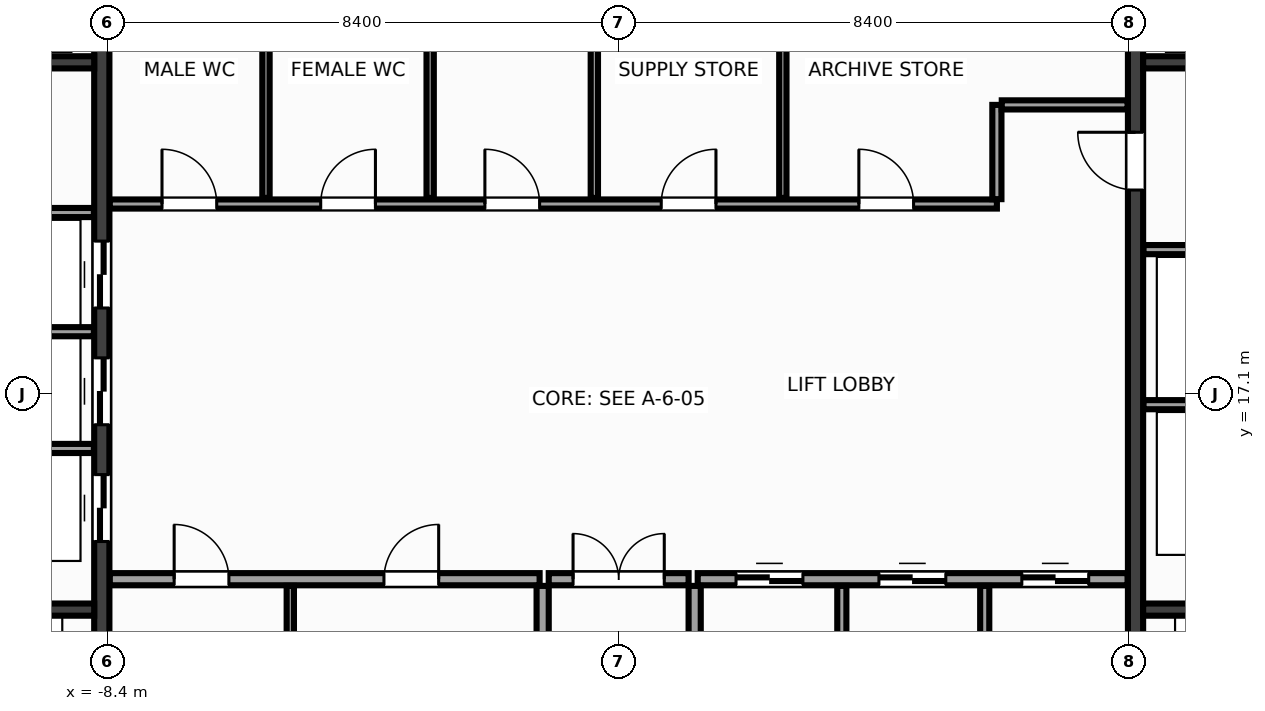
"""IFC4 building model, lengths in metres.
Left out: names, types, materials, properties, quantities, classifications, styles, units other than length and angle.
Written with IfcOpenShell. Run it as: python <this file> out.ifc"""

import sys

from ifc_helpers import new_model, si_unit, direction, frame, frame_2d, origin, place, context, subcontext, project, spatial, rectangle, extrude, source, transform, mapped, element, fill, save


model = new_model("IFC4")
c1 = context("Model", 3, precision=1e-05, world=origin(), true_north=direction((0.0, 1.0)))
c2 = subcontext(c1, "Body", "Model", "MODEL_VIEW")
j1 = project(units=[si_unit("LENGTHUNIT", "METRE"), si_unit("PLANEANGLEUNIT", "RADIAN")], contexts=[c1])
p1 = place(None, origin())
s1 = spatial("IfcSite", under=j1, at=p1, CompositionType="ELEMENT")
p2 = place(p1, origin())
s2 = spatial("IfcBuilding", under=s1, at=p2, CompositionType="ELEMENT")
p3 = place(p2, frame((0.0, 0.0, 182.0)))
s3 = spatial("IfcBuildingStorey", under=s2, at=p3, CompositionType="ELEMENT", Elevation=182.0)
m1 = source(origin(), c2, "Body", "SweptSolid", [
    extrude(rectangle(XDim=12.95, YDim=0.25, at=frame_2d((6.475, 0.0))), origin(), (0.0, 0.0, 1.0), 3.6),
])
p4 = place(p3, frame((-8.5, 10.525, 0.0), z_axis=(0.0, 0.0, 1.0), x_axis=(0.0, 1.0, 0.0)))
e1 = element("IfcWall", 1, at=p4, inside=s3, PredefinedType="SHEAR", context=c2, shape_type="MappedRepresentation", body=[
    mapped(m1, transform((0.0, 0.0, 0.0), x_axis=(1.0, 0.0, 0.0), y_axis=(0.0, 1.0, 0.0), z_axis=(0.0, 0.0, 1.0), scale=1.0)),
])
p5 = place(p4, frame((4.145, 0.0, 0.0)))
e2 = element("IfcOpeningElement", 2, at=p5, cuts=e1, PredefinedType="OPENING", context=c2, shape_type="SweptSolid", body=[
    extrude(rectangle(XDim=1.1, YDim=2.15, at=frame_2d((0.55, 1.075))), frame((0.0, 0.137, 0.0), z_axis=(0.0, -1.0, 0.0), x_axis=(1.0, 0.0, 0.0)), (0.0, 0.0, 1.0), 0.274),
])
p6 = place(p4, frame((6.065, 0.0, 0.0)))
e3 = element("IfcOpeningElement", 3, at=p6, cuts=e1, PredefinedType="OPENING", context=c2, shape_type="SweptSolid", body=[
    extrude(rectangle(XDim=1.1, YDim=2.15, at=frame_2d((0.55, 1.075))), frame((0.0, 0.137, 0.0), z_axis=(0.0, -1.0, 0.0), x_axis=(1.0, 0.0, 0.0)), (0.0, 0.0, 1.0), 0.274),
])
p7 = place(p4, frame((7.985, 0.0, 0.0)))
e4 = element("IfcOpeningElement", 4, at=p7, cuts=e1, PredefinedType="OPENING", context=c2, shape_type="SweptSolid", body=[
    extrude(rectangle(XDim=1.1, YDim=2.15, at=frame_2d((0.55, 1.075))), frame((0.0, 0.137, 0.0), z_axis=(0.0, -1.0, 0.0), x_axis=(1.0, 0.0, 0.0)), (0.0, 0.0, 1.0), 0.274),
])
p8 = place(p3, frame((8.5, 10.525, 0.0), z_axis=(0.0, 0.0, 1.0), x_axis=(0.0, 1.0, 0.0)))
e5 = element("IfcWall", 5, at=p8, inside=s3, PredefinedType="SHEAR", context=c2, shape_type="MappedRepresentation", body=[
    mapped(m1, transform((0.0, 0.0, 0.0), x_axis=(1.0, 0.0, 0.0), y_axis=(0.0, 1.0, 0.0), z_axis=(0.0, 0.0, 1.0), scale=1.0)),
])
p9 = place(p8, frame((9.925, 0.0, 0.0)))
e6 = element("IfcOpeningElement", 6, at=p9, cuts=e5, PredefinedType="OPENING", context=c2, shape_type="SweptSolid", body=[
    extrude(rectangle(XDim=0.95, YDim=2.15, at=frame_2d((0.475, 1.075))), frame((0.0, 0.137, 0.0), z_axis=(0.0, -1.0, 0.0), x_axis=(1.0, 0.0, 0.0)), (0.0, 0.0, 1.0), 0.274),
])
m2 = source(origin(), c2, "Body", "SweptSolid", [
    extrude(rectangle(XDim=2.825, YDim=0.2, at=frame_2d((1.413, 0.0))), origin(), (0.0, 0.0, 1.0), 3.6),
])
for number, where, z_axis, x_axis in (
    (7, (-11.45, 13.55, 0.0), (0.0, 0.0, 1.0), (1.0, 0.0, 0.0)),
    (8, (8.625, 13.55, 0.0), (0.0, 0.0, 1.0), (1.0, 0.0, 0.0)),
):
    element("IfcWall", number, at=place(p3, frame(where, z_axis=z_axis, x_axis=x_axis)), inside=s3, PredefinedType="SHEAR", context=c2, shape_type="MappedRepresentation", body=[
        mapped(m2, transform((0.0, 0.0, 0.0), x_axis=(1.0, 0.0, 0.0), y_axis=(0.0, 1.0, 0.0), z_axis=(0.0, 0.0, 1.0), scale=1.0)),
    ])
m3 = source(origin(), c2, "Body", "SweptSolid", [
    extrude(rectangle(XDim=3.02, YDim=0.2, at=frame_2d((1.51, 0.0))), origin(), (0.0, 0.0, 1.0), 3.6),
])
for number, where, z_axis, x_axis in (
    (9, (-11.645, 22.55, 0.0), (0.0, 0.0, 1.0), (1.0, 0.0, 0.0)),
    (10, (8.625, 22.55, 0.0), (0.0, 0.0, 1.0), (1.0, 0.0, 0.0)),
):
    element("IfcWall", number, at=place(p3, frame(where, z_axis=z_axis, x_axis=x_axis)), inside=s3, PredefinedType="SHEAR", context=c2, shape_type="MappedRepresentation", body=[
        mapped(m3, transform((0.0, 0.0, 0.0), x_axis=(1.0, 0.0, 0.0), y_axis=(0.0, 1.0, 0.0), z_axis=(0.0, 0.0, 1.0), scale=1.0)),
    ])
m4 = source(origin(), c2, "Body", "SweptSolid", [
    extrude(rectangle(XDim=3.01, YDim=0.15, at=frame_2d((1.505, 0.0))), origin(), (0.0, 0.0, 1.0), 3.38),
])
for number, where, z_axis, x_axis in (
    (11, (-11.64, 16.2, 0.0), (0.0, 0.0, 1.0), (1.0, 0.0, 0.0)),
    (12, (-11.64, 18.12, 0.0), (0.0, 0.0, 1.0), (1.0, 0.0, 0.0)),
    (13, (-11.64, 20.08, 0.0), (0.0, 0.0, 1.0), (1.0, 0.0, 0.0)),
    (14, (8.63, 16.92, 0.0), (0.0, 0.0, 1.0), (1.0, 0.0, 0.0)),
    (15, (8.63, 19.47, 0.0), (0.0, 0.0, 1.0), (1.0, 0.0, 0.0)),
):
    element("IfcWall", number, at=place(p3, frame(where, z_axis=z_axis, x_axis=x_axis)), inside=s3, PredefinedType="PARTITIONING", context=c2, shape_type="MappedRepresentation", body=[
        mapped(m4, transform((0.0, 0.0, 0.0), x_axis=(1.0, 0.0, 0.0), y_axis=(0.0, 1.0, 0.0), z_axis=(0.0, 0.0, 1.0), scale=1.0)),
    ])
m5 = source(origin(), c2, "Body", "SweptSolid", [
    extrude(rectangle(XDim=7.07, YDim=0.2, at=frame_2d((3.535, 0.0))), origin(), (0.0, 0.0, 1.0), 3.38),
])
p10 = place(p3, frame((-8.37, 14.05, 0.0), z_axis=(0.0, 0.0, 1.0), x_axis=(1.0, 0.0, 0.0)))
e16 = element("IfcWall", 16, at=p10, inside=s3, PredefinedType="PARTITIONING", context=c2, shape_type="MappedRepresentation", body=[
    mapped(m5, transform((0.0, 0.0, 0.0), x_axis=(1.0, 0.0, 0.0), y_axis=(0.0, 1.0, 0.0), z_axis=(0.0, 0.0, 1.0), scale=1.0)),
])
p11 = place(p10, frame((1.06, 0.0, 0.0)))
e17 = element("IfcOpeningElement", 17, at=p11, cuts=e16, PredefinedType="OPENING", context=c2, shape_type="SweptSolid", body=[
    extrude(rectangle(XDim=0.9, YDim=2.15, at=frame_2d((0.45, 1.075))), frame((0.0, 0.112, 0.0), z_axis=(0.0, -1.0, 0.0), x_axis=(1.0, 0.0, 0.0)), (0.0, 0.0, 1.0), 0.224),
])
p12 = place(p10, frame((4.51, 0.0, 0.0)))
e18 = element("IfcOpeningElement", 18, at=p12, cuts=e16, PredefinedType="OPENING", context=c2, shape_type="SweptSolid", body=[
    extrude(rectangle(XDim=0.9, YDim=2.15, at=frame_2d((0.45, 1.075))), frame((0.0, 0.112, 0.0), z_axis=(0.0, -1.0, 0.0), x_axis=(1.0, 0.0, 0.0)), (0.0, 0.0, 1.0), 0.224),
])
p13 = place(p3, frame((1.3, 14.05, 0.0), z_axis=(0.0, 0.0, 1.0), x_axis=(1.0, 0.0, 0.0)))
e19 = element("IfcWall", 19, at=p13, inside=s3, PredefinedType="PARTITIONING", context=c2, shape_type="MappedRepresentation", body=[
    mapped(m5, transform((0.0, 0.0, 0.0), x_axis=(1.0, 0.0, 0.0), y_axis=(0.0, 1.0, 0.0), z_axis=(0.0, 0.0, 1.0), scale=1.0)),
])
p14 = place(p13, frame((0.63, 0.0, 0.0)))
e20 = element("IfcOpeningElement", 20, at=p14, cuts=e19, PredefinedType="OPENING", context=c2, shape_type="SweptSolid", body=[
    extrude(rectangle(XDim=1.1, YDim=2.15, at=frame_2d((0.55, 1.075))), frame((0.0, 0.112, 0.0), z_axis=(0.0, -1.0, 0.0), x_axis=(1.0, 0.0, 0.0)), (0.0, 0.0, 1.0), 0.224),
])
p15 = place(p13, frame((2.98, 0.0, 0.0)))
e21 = element("IfcOpeningElement", 21, at=p15, cuts=e19, PredefinedType="OPENING", context=c2, shape_type="SweptSolid", body=[
    extrude(rectangle(XDim=1.1, YDim=2.15, at=frame_2d((0.55, 1.075))), frame((0.0, 0.112, 0.0), z_axis=(0.0, -1.0, 0.0), x_axis=(1.0, 0.0, 0.0)), (0.0, 0.0, 1.0), 0.224),
])
p16 = place(p13, frame((5.33, 0.0, 0.0)))
e22 = element("IfcOpeningElement", 22, at=p16, cuts=e19, PredefinedType="OPENING", context=c2, shape_type="SweptSolid", body=[
    extrude(rectangle(XDim=1.1, YDim=2.15, at=frame_2d((0.55, 1.075))), frame((0.0, 0.112, 0.0), z_axis=(0.0, -1.0, 0.0), x_axis=(1.0, 0.0, 0.0)), (0.0, 0.0, 1.0), 0.224),
])
m6 = source(origin(), c2, "Body", "SweptSolid", [
    extrude(rectangle(XDim=3.415, YDim=0.2, at=frame_2d((1.708, 0.0))), origin(), (0.0, 0.0, 1.0), 3.38),
])
for number, where, z_axis, x_axis in (
    (23, (-1.25, 10.525, 0.0), (0.0, 0.0, 1.0), (0.0, 1.0, 0.0)),
    (24, (1.25, 10.525, 0.0), (0.0, 0.0, 1.0), (0.0, 1.0, 0.0)),
):
    element("IfcWall", number, at=place(p3, frame(where, z_axis=z_axis, x_axis=x_axis)), inside=s3, PredefinedType="PARTITIONING", context=c2, shape_type="MappedRepresentation", body=[
        mapped(m6, transform((0.0, 0.0, 0.0), x_axis=(1.0, 0.0, 0.0), y_axis=(0.0, 1.0, 0.0), z_axis=(0.0, 0.0, 1.0), scale=1.0)),
    ])
m7 = source(origin(), c2, "Body", "SweptSolid", [
    extrude(rectangle(XDim=2.3, YDim=0.2, at=frame_2d((1.15, 0.0))), origin(), (0.0, 0.0, 1.0), 3.38),
])
p17 = place(p3, frame((-1.15, 14.05, 0.0), z_axis=(0.0, 0.0, 1.0), x_axis=(1.0, 0.0, 0.0)))
e25 = element("IfcWall", 25, at=p17, inside=s3, PredefinedType="PARTITIONING", context=c2, shape_type="MappedRepresentation", body=[
    mapped(m7, transform((0.0, 0.0, 0.0), x_axis=(1.0, 0.0, 0.0), y_axis=(0.0, 1.0, 0.0), z_axis=(0.0, 0.0, 1.0), scale=1.0)),
])
p18 = place(p17, frame((0.4, 0.0, 0.0)))
e26 = element("IfcOpeningElement", 26, at=p18, cuts=e25, PredefinedType="OPENING", context=c2, shape_type="SweptSolid", body=[
    extrude(rectangle(XDim=1.5, YDim=2.2, at=frame_2d((0.75, 1.1))), frame((0.0, 0.112, 0.0), z_axis=(0.0, -1.0, 0.0), x_axis=(1.0, 0.0, 0.0)), (0.0, 0.0, 1.0), 0.224),
])
m8 = source(origin(), c2, "Body", "SweptSolid", [
    extrude(rectangle(XDim=14.59, YDim=0.15, at=frame_2d((7.295, 0.0))), origin(), (0.0, 0.0, 1.0), 3.38),
])
p19 = place(p3, frame((-8.37, 20.22, 0.0), z_axis=(0.0, 0.0, 1.0), x_axis=(1.0, 0.0, 0.0)))
e27 = element("IfcWall", 27, at=p19, inside=s3, PredefinedType="PARTITIONING", context=c2, shape_type="MappedRepresentation", body=[
    mapped(m8, transform((0.0, 0.0, 0.0), x_axis=(1.0, 0.0, 0.0), y_axis=(0.0, 1.0, 0.0), z_axis=(0.0, 0.0, 1.0), scale=1.0)),
])
p20 = place(p19, frame((0.86, 0.0, 0.0)))
e28 = element("IfcOpeningElement", 28, at=p20, cuts=e27, PredefinedType="OPENING", context=c2, shape_type="SweptSolid", body=[
    extrude(rectangle(XDim=0.9, YDim=2.15, at=frame_2d((0.45, 1.075))), frame((0.0, 0.087, 0.0), z_axis=(0.0, -1.0, 0.0), x_axis=(1.0, 0.0, 0.0)), (0.0, 0.0, 1.0), 0.174),
])
p21 = place(p19, frame((3.47, 0.0, 0.0)))
e29 = element("IfcOpeningElement", 29, at=p21, cuts=e27, PredefinedType="OPENING", context=c2, shape_type="SweptSolid", body=[
    extrude(rectangle(XDim=0.9, YDim=2.15, at=frame_2d((0.45, 1.075))), frame((0.0, 0.087, 0.0), z_axis=(0.0, -1.0, 0.0), x_axis=(1.0, 0.0, 0.0)), (0.0, 0.0, 1.0), 0.174),
])
p22 = place(p19, frame((6.17, 0.0, 0.0)))
e30 = element("IfcOpeningElement", 30, at=p22, cuts=e27, PredefinedType="OPENING", context=c2, shape_type="SweptSolid", body=[
    extrude(rectangle(XDim=0.9, YDim=2.15, at=frame_2d((0.45, 1.075))), frame((0.0, 0.087, 0.0), z_axis=(0.0, -1.0, 0.0), x_axis=(1.0, 0.0, 0.0)), (0.0, 0.0, 1.0), 0.174),
])
p23 = place(p19, frame((9.07, 0.0, 0.0)))
e31 = element("IfcOpeningElement", 31, at=p23, cuts=e27, PredefinedType="OPENING", context=c2, shape_type="SweptSolid", body=[
    extrude(rectangle(XDim=0.9, YDim=2.15, at=frame_2d((0.45, 1.075))), frame((0.0, 0.087, 0.0), z_axis=(0.0, -1.0, 0.0), x_axis=(1.0, 0.0, 0.0)), (0.0, 0.0, 1.0), 0.174),
])
p24 = place(p19, frame((12.32, 0.0, 0.0)))
e32 = element("IfcOpeningElement", 32, at=p24, cuts=e27, PredefinedType="OPENING", context=c2, shape_type="SweptSolid", body=[
    extrude(rectangle(XDim=0.9, YDim=2.15, at=frame_2d((0.45, 1.075))), frame((0.0, 0.087, 0.0), z_axis=(0.0, -1.0, 0.0), x_axis=(1.0, 0.0, 0.0)), (0.0, 0.0, 1.0), 0.174),
])
m9 = source(origin(), c2, "Body", "SweptSolid", [
    extrude(rectangle(XDim=1.55, YDim=0.15, at=frame_2d((0.775, 0.0))), origin(), (0.0, 0.0, 1.0), 3.38),
])
p25 = place(p3, frame((6.22, 20.3, 0.0), z_axis=(0.0, 0.0, 1.0), x_axis=(0.0, 1.0, 0.0)))
e33 = element("IfcWall", 33, at=p25, inside=s3, PredefinedType="PARTITIONING", context=c2, shape_type="MappedRepresentation", body=[
    mapped(m9, transform((0.0, 0.0, 0.0), x_axis=(1.0, 0.0, 0.0), y_axis=(0.0, 1.0, 0.0), z_axis=(0.0, 0.0, 1.0), scale=1.0)),
])
m10 = source(origin(), c2, "Body", "SweptSolid", [
    extrude(rectangle(XDim=2.07, YDim=0.15, at=frame_2d((1.035, 0.0))), origin(), (0.0, 0.0, 1.0), 3.38),
])
p26 = place(p3, frame((6.3, 21.85, 0.0), z_axis=(0.0, 0.0, 1.0), x_axis=(1.0, 0.0, 0.0)))
e34 = element("IfcWall", 34, at=p26, inside=s3, PredefinedType="PARTITIONING", context=c2, shape_type="MappedRepresentation", body=[
    mapped(m10, transform((0.0, 0.0, 0.0), x_axis=(1.0, 0.0, 0.0), y_axis=(0.0, 1.0, 0.0), z_axis=(0.0, 0.0, 1.0), scale=1.0)),
])
m11 = source(origin(), c2, "Body", "SweptSolid", [
    extrude(rectangle(XDim=3.415, YDim=0.12, at=frame_2d((1.708, 0.0))), origin(), (0.0, 0.0, 1.0), 3.38),
])
p27 = place(p3, frame((-5.4, 10.525, 0.0), z_axis=(0.0, 0.0, 1.0), x_axis=(0.0, 1.0, 0.0)))
e35 = element("IfcWall", 35, at=p27, inside=s3, PredefinedType="PARTITIONING", context=c2, shape_type="MappedRepresentation", body=[
    mapped(m11, transform((0.0, 0.0, 0.0), x_axis=(1.0, 0.0, 0.0), y_axis=(0.0, 1.0, 0.0), z_axis=(0.0, 0.0, 1.0), scale=1.0)),
])
m12 = source(origin(), c2, "Body", "SweptSolid", [
    extrude(rectangle(XDim=3.415, YDim=0.15, at=frame_2d((1.708, 0.0))), origin(), (0.0, 0.0, 1.0), 3.38),
])
for number, where, z_axis, x_axis in (
    (36, (3.67, 10.525, 0.0), (0.0, 0.0, 1.0), (0.0, 1.0, 0.0)),
    (37, (6.02, 10.525, 0.0), (0.0, 0.0, 1.0), (0.0, 1.0, 0.0)),
):
    element("IfcWall", number, at=place(p3, frame(where, z_axis=z_axis, x_axis=x_axis)), inside=s3, PredefinedType="PARTITIONING", context=c2, shape_type="MappedRepresentation", body=[
        mapped(m12, transform((0.0, 0.0, 0.0), x_axis=(1.0, 0.0, 0.0), y_axis=(0.0, 1.0, 0.0), z_axis=(0.0, 0.0, 1.0), scale=1.0)),
    ])
m13 = source(origin(), c2, "Body", "SweptSolid", [
    extrude(rectangle(XDim=3.115, YDim=0.12, at=frame_2d((1.558, 0.0))), origin(), (0.0, 0.0, 1.0), 3.38),
])
for number, where, z_axis, x_axis in (
    (38, (-5.8, 20.32, 0.0), (0.0, 0.0, 1.0), (0.0, 1.0, 0.0)),
    (39, (-3.1, 20.32, 0.0), (0.0, 0.0, 1.0), (0.0, 1.0, 0.0)),
    (40, (-0.4, 20.32, 0.0), (0.0, 0.0, 1.0), (0.0, 1.0, 0.0)),
    (41, (2.7, 20.32, 0.0), (0.0, 0.0, 1.0), (0.0, 1.0, 0.0)),
):
    element("IfcWall", number, at=place(p3, frame(where, z_axis=z_axis, x_axis=x_axis)), inside=s3, PredefinedType="PARTITIONING", context=c2, shape_type="MappedRepresentation", body=[
        mapped(m13, transform((0.0, 0.0, 0.0), x_axis=(1.0, 0.0, 0.0), y_axis=(0.0, 1.0, 0.0), z_axis=(0.0, 0.0, 1.0), scale=1.0)),
    ])
m14 = source(origin(), c2, "Body", "SweptSolid", [
    extrude(rectangle(XDim=1.1, YDim=2.15, at=frame_2d((0.55, 1.075))), frame((0.0, 0.025, 0.0), z_axis=(0.0, -1.0, 0.0), x_axis=(1.0, 0.0, 0.0)), (0.0, 0.0, 1.0), 0.05),
])
p28 = place(p5, origin())
e42 = element("IfcDoor", 42, at=p28, inside=s3, OperationType="DOUBLE_DOOR_SLIDING", PredefinedType="DOOR", context=c2, shape_type="MappedRepresentation", body=[
    mapped(m14, transform((0.0, 0.0, 0.0), x_axis=(1.0, 0.0, 0.0), y_axis=(0.0, 1.0, 0.0), z_axis=(0.0, 0.0, 1.0), scale=1.0)),
])
fill(e2, e42)
p29 = place(p6, origin())
e43 = element("IfcDoor", 43, at=p29, inside=s3, OperationType="DOUBLE_DOOR_SLIDING", PredefinedType="DOOR", context=c2, shape_type="MappedRepresentation", body=[
    mapped(m14, transform((0.0, 0.0, 0.0), x_axis=(1.0, 0.0, 0.0), y_axis=(0.0, 1.0, 0.0), z_axis=(0.0, 0.0, 1.0), scale=1.0)),
])
fill(e3, e43)
p30 = place(p7, origin())
e44 = element("IfcDoor", 44, at=p30, inside=s3, OperationType="DOUBLE_DOOR_SLIDING", PredefinedType="DOOR", context=c2, shape_type="MappedRepresentation", body=[
    mapped(m14, transform((0.0, 0.0, 0.0), x_axis=(1.0, 0.0, 0.0), y_axis=(0.0, 1.0, 0.0), z_axis=(0.0, 0.0, 1.0), scale=1.0)),
])
fill(e4, e44)
m15 = source(origin(), c2, "Body", "SweptSolid", [
    extrude(rectangle(XDim=0.95, YDim=2.15, at=frame_2d((0.475, 1.075))), frame((0.0, 0.025, 0.0), z_axis=(0.0, -1.0, 0.0), x_axis=(1.0, 0.0, 0.0)), (0.0, 0.0, 1.0), 0.05),
])
p31 = place(p9, origin())
e45 = element("IfcDoor", 45, at=p31, inside=s3, OperationType="SINGLE_SWING_RIGHT", PredefinedType="DOOR", context=c2, shape_type="MappedRepresentation", body=[
    mapped(m15, transform((0.0, 0.0, 0.0), x_axis=(1.0, 0.0, 0.0), y_axis=(0.0, 1.0, 0.0), z_axis=(0.0, 0.0, 1.0), scale=1.0)),
])
fill(e6, e45)
m16 = source(origin(), c2, "Body", "SweptSolid", [
    extrude(rectangle(XDim=0.9, YDim=2.15, at=frame_2d((0.45, 1.075))), frame((0.0, 0.025, 0.0), z_axis=(0.0, -1.0, 0.0), x_axis=(1.0, 0.0, 0.0)), (0.0, 0.0, 1.0), 0.05),
])
p32 = place(p11, origin())
e46 = element("IfcDoor", 46, at=p32, inside=s3, OperationType="SINGLE_SWING_LEFT", PredefinedType="DOOR", context=c2, shape_type="MappedRepresentation", body=[
    mapped(m16, transform((0.0, 0.0, 0.0), x_axis=(1.0, 0.0, 0.0), y_axis=(0.0, 1.0, 0.0), z_axis=(0.0, 0.0, 1.0), scale=1.0)),
])
fill(e17, e46)
p33 = place(p12, origin())
e47 = element("IfcDoor", 47, at=p33, inside=s3, OperationType="SINGLE_SWING_RIGHT", PredefinedType="DOOR", context=c2, shape_type="MappedRepresentation", body=[
    mapped(m16, transform((0.0, 0.0, 0.0), x_axis=(1.0, 0.0, 0.0), y_axis=(0.0, 1.0, 0.0), z_axis=(0.0, 0.0, 1.0), scale=1.0)),
])
fill(e18, e47)
p34 = place(p14, origin())
e48 = element("IfcDoor", 48, at=p34, inside=s3, OperationType="DOUBLE_DOOR_SLIDING", PredefinedType="DOOR", context=c2, shape_type="MappedRepresentation", body=[
    mapped(m14, transform((0.0, 0.0, 0.0), x_axis=(1.0, 0.0, 0.0), y_axis=(0.0, 1.0, 0.0), z_axis=(0.0, 0.0, 1.0), scale=1.0)),
])
fill(e20, e48)
p35 = place(p15, origin())
e49 = element("IfcDoor", 49, at=p35, inside=s3, OperationType="DOUBLE_DOOR_SLIDING", PredefinedType="DOOR", context=c2, shape_type="MappedRepresentation", body=[
    mapped(m14, transform((0.0, 0.0, 0.0), x_axis=(1.0, 0.0, 0.0), y_axis=(0.0, 1.0, 0.0), z_axis=(0.0, 0.0, 1.0), scale=1.0)),
])
fill(e21, e49)
p36 = place(p16, origin())
e50 = element("IfcDoor", 50, at=p36, inside=s3, OperationType="DOUBLE_DOOR_SLIDING", PredefinedType="DOOR", context=c2, shape_type="MappedRepresentation", body=[
    mapped(m14, transform((0.0, 0.0, 0.0), x_axis=(1.0, 0.0, 0.0), y_axis=(0.0, 1.0, 0.0), z_axis=(0.0, 0.0, 1.0), scale=1.0)),
])
fill(e22, e50)
m17 = source(origin(), c2, "Body", "SweptSolid", [
    extrude(rectangle(XDim=1.5, YDim=2.2, at=frame_2d((0.75, 1.1))), frame((0.0, 0.025, 0.0), z_axis=(0.0, -1.0, 0.0), x_axis=(1.0, 0.0, 0.0)), (0.0, 0.0, 1.0), 0.05),
])
p37 = place(p18, origin())
e51 = element("IfcDoor", 51, at=p37, inside=s3, OperationType="DOUBLE_DOOR_SINGLE_SWING", PredefinedType="DOOR", context=c2, shape_type="MappedRepresentation", body=[
    mapped(m17, transform((0.0, 0.0, 0.0), x_axis=(1.0, 0.0, 0.0), y_axis=(0.0, 1.0, 0.0), z_axis=(0.0, 0.0, 1.0), scale=1.0)),
])
fill(e26, e51)
p38 = place(p20, origin())
e52 = element("IfcDoor", 52, at=p38, inside=s3, OperationType="SINGLE_SWING_LEFT", PredefinedType="DOOR", context=c2, shape_type="MappedRepresentation", body=[
    mapped(m16, transform((0.0, 0.0, 0.0), x_axis=(1.0, 0.0, 0.0), y_axis=(0.0, 1.0, 0.0), z_axis=(0.0, 0.0, 1.0), scale=1.0)),
])
fill(e28, e52)
p39 = place(p21, origin())
e53 = element("IfcDoor", 53, at=p39, inside=s3, OperationType="SINGLE_SWING_RIGHT", PredefinedType="DOOR", context=c2, shape_type="MappedRepresentation", body=[
    mapped(m16, transform((0.0, 0.0, 0.0), x_axis=(1.0, 0.0, 0.0), y_axis=(0.0, 1.0, 0.0), z_axis=(0.0, 0.0, 1.0), scale=1.0)),
])
fill(e29, e53)
p40 = place(p22, origin())
e54 = element("IfcDoor", 54, at=p40, inside=s3, OperationType="SINGLE_SWING_LEFT", PredefinedType="DOOR", context=c2, shape_type="MappedRepresentation", body=[
    mapped(m16, transform((0.0, 0.0, 0.0), x_axis=(1.0, 0.0, 0.0), y_axis=(0.0, 1.0, 0.0), z_axis=(0.0, 0.0, 1.0), scale=1.0)),
])
fill(e30, e54)
p41 = place(p23, origin())
e55 = element("IfcDoor", 55, at=p41, inside=s3, OperationType="SINGLE_SWING_RIGHT", PredefinedType="DOOR", context=c2, shape_type="MappedRepresentation", body=[
    mapped(m16, transform((0.0, 0.0, 0.0), x_axis=(1.0, 0.0, 0.0), y_axis=(0.0, 1.0, 0.0), z_axis=(0.0, 0.0, 1.0), scale=1.0)),
])
fill(e31, e55)
p42 = place(p24, origin())
e56 = element("IfcDoor", 56, at=p42, inside=s3, OperationType="SINGLE_SWING_LEFT", PredefinedType="DOOR", context=c2, shape_type="MappedRepresentation", body=[
    mapped(m16, transform((0.0, 0.0, 0.0), x_axis=(1.0, 0.0, 0.0), y_axis=(0.0, 1.0, 0.0), z_axis=(0.0, 0.0, 1.0), scale=1.0)),
])
fill(e32, e56)
save(model, sys.argv[1])
